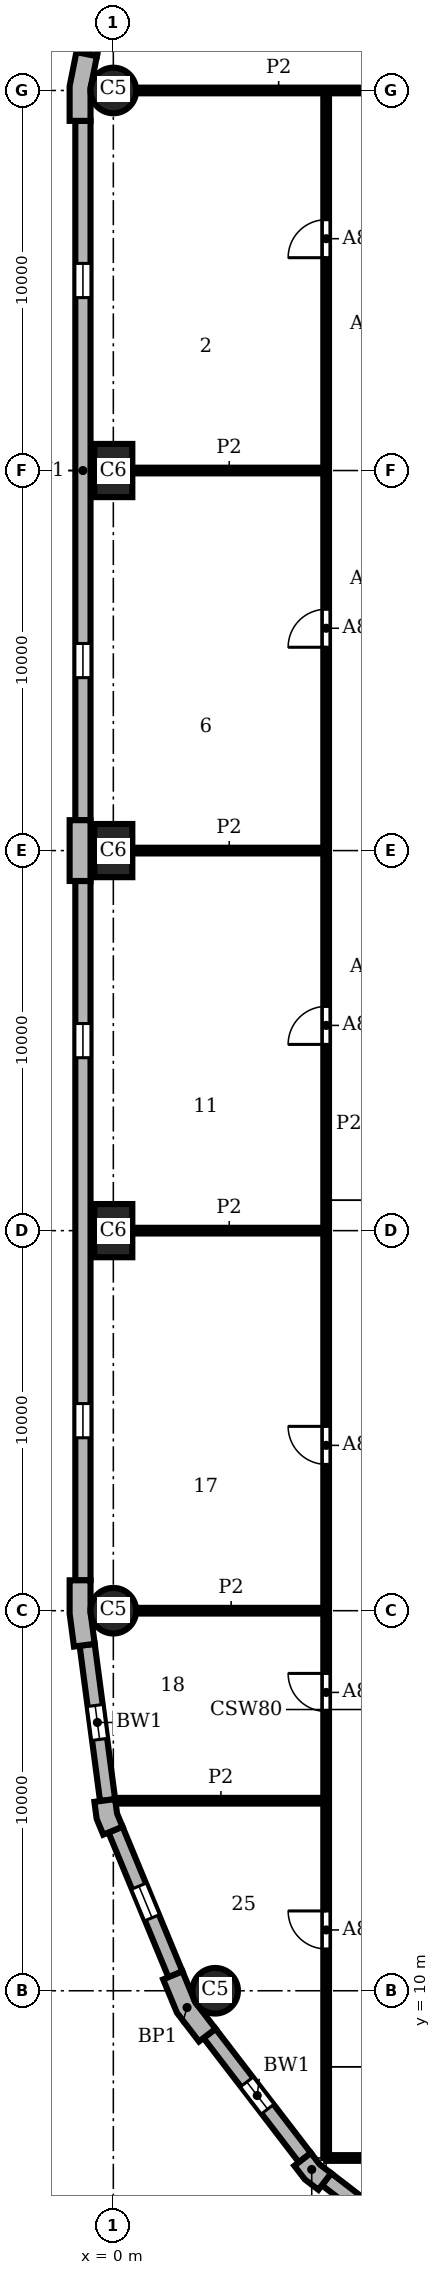
"""IFC4 building model, lengths in metres.
Left out: names, types, materials, properties, quantities, classifications, styles, units other than length and angle.
Written with IfcOpenShell. Run it as: python <this file> out.ifc"""

import sys

from ifc_helpers import new_model, si_unit, direction, frame, frame_2d, origin, origin_2d, place, context, subcontext, project, spatial, polyline, rectangle, circle, outline, extrude, element, fill, save


model = new_model("IFC4")
c1 = context("Model", 3, precision=1e-05, world=origin(), true_north=direction((0.0, 1.0)))
c2 = subcontext(c1, "Body", "Model", "MODEL_VIEW")
j1 = project(units=[si_unit("LENGTHUNIT", "METRE"), si_unit("PLANEANGLEUNIT", "RADIAN")], contexts=[c1])
p1 = place(None, origin())
s1 = spatial("IfcSite", under=j1, at=p1, CompositionType="ELEMENT")
p2 = place(p1, origin())
s2 = spatial("IfcBuilding", under=s1, at=p2, CompositionType="ELEMENT")
p3 = place(p2, frame((0.0, 0.0, 93.9)))
s3 = spatial("IfcBuildingStorey", under=s2, at=p3, CompositionType="ELEMENT", Elevation=93.9)
p4 = place(p3, frame((0.0, 60.0, 0.0), z_axis=(0.0, 0.0, 1.0), x_axis=(1.0, 0.0, 0.0)))
e1 = element("IfcColumn", 1, at=p4, inside=s3, PredefinedType="COLUMN", context=c2, shape_type="SweptSolid", body=[
    extrude(circle(Radius=0.6, at=origin_2d()), origin(), (0.0, 0.0, 1.0), 3.9),
])
for number, where, z_axis, x_axis in (
    (2, (0.0, 50.0, 0.0), (0.0, 0.0, 1.0), (0.0, 1.0, 0.0)),
    (3, (0.0, 40.0, 0.0), (0.0, 0.0, 1.0), (0.0, 1.0, 0.0)),
    (4, (0.0, 30.0, 0.0), (0.0, 0.0, 1.0), (0.0, 1.0, 0.0)),
):
    element("IfcColumn", number, at=place(p3, frame(where, z_axis=z_axis, x_axis=x_axis)), inside=s3, PredefinedType="COLUMN", context=c2, shape_type="SweptSolid", body=[
        extrude(rectangle(XDim=1.4, YDim=1.0, at=origin_2d()), origin(), (0.0, 0.0, 1.0), 3.9),
    ])
for number, where, z_axis, x_axis in (
    (5, (0.0, 20.0, 0.0), (0.0, 0.0, 1.0), (1.0, 0.0, 0.0)),
    (6, (2.679, 10.0, 0.0), (0.0, 0.0, 1.0), (1.0, 0.0, 0.0)),
):
    element("IfcColumn", number, at=place(p3, frame(where, z_axis=z_axis, x_axis=x_axis)), inside=s3, PredefinedType="COLUMN", context=c2, shape_type="SweptSolid", body=[
        extrude(circle(Radius=0.6, at=origin_2d()), origin(), (0.0, 0.0, 1.0), 3.9),
    ])
p5 = place(p3, origin())
e7 = element("IfcWall", 7, at=p5, inside=s3, PredefinedType="SOLIDWALL", context=c2, shape_type="SweptSolid", body=[
    extrude(outline(polyline([(-0.825, 60.98), (-0.972, 61.009), (-1.15, 60.113), (-1.15, 59.2), (-1.0, 59.2), (-0.6, 59.2), (-0.6, 60.059), (-0.432, 60.902), (-0.825, 60.98)])), origin(), (0.0, 0.0, 1.0), 3.9),
])
e8 = element("IfcWall", 8, at=p5, inside=s3, PredefinedType="SOLIDWALL", context=c2, shape_type="SweptSolid", body=[
    extrude(outline(polyline([(-1.0, 40.8), (-1.15, 40.8), (-1.15, 40.0), (-1.15, 39.2), (-1.0, 39.2), (-0.6, 39.2), (-0.6, 40.0), (-0.6, 40.8), (-1.0, 40.8)])), origin(), (0.0, 0.0, 1.0), 3.9),
])
e9 = element("IfcWall", 9, at=p5, inside=s3, PredefinedType="SOLIDWALL", context=c2, shape_type="SweptSolid", body=[
    extrude(outline(polyline([(-1.0, 20.8), (-1.15, 20.8), (-1.15, 19.925), (-1.036, 19.057), (-0.887, 19.076), (-0.49, 19.128), (-0.6, 19.961), (-0.6, 20.8), (-1.0, 20.8)])), origin(), (0.0, 0.0, 1.0), 3.9),
])
e10 = element("IfcWall", 10, at=p5, inside=s3, PredefinedType="SOLIDWALL", context=c2, shape_type="SweptSolid", body=[
    extrude(outline(polyline([(-0.349, 14.99), (-0.498, 14.971), (-0.439, 14.523), (-0.266, 14.106), (-0.128, 14.164), (0.242, 14.317), (0.097, 14.667), (0.047, 15.043), (-0.349, 14.99)])), origin(), (0.0, 0.0, 1.0), 3.9),
])
e11 = element("IfcWall", 11, at=p5, inside=s3, PredefinedType="SOLIDWALL", context=c2, shape_type="SweptSolid", body=[
    extrude(outline(polyline([(1.449, 10.356), (1.311, 10.299), (1.675, 9.42), (2.254, 8.665), (2.373, 8.757), (2.69, 9.0), (2.155, 9.698), (1.819, 10.51), (1.449, 10.356)])), origin(), (0.0, 0.0, 1.0), 3.9),
])
e12 = element("IfcWall", 12, at=p5, inside=s3, PredefinedType="SOLIDWALL", context=c2, shape_type="SweptSolid", body=[
    extrude(outline(polyline([(4.882, 5.487), (4.763, 5.396), (5.038, 5.038), (5.396, 4.763), (5.487, 4.882), (5.731, 5.199), (5.43, 5.43), (5.199, 5.731), (4.882, 5.487)])), origin(), (0.0, 0.0, 1.0), 3.9),
])
p6 = place(p3, frame((0.299, 65.602, 0.0), z_axis=(0.0, 0.0, 1.0), x_axis=(-0.195098533057, -0.98078364709, 0.0)))
e13 = element("IfcWall", 13, at=p6, inside=s3, PredefinedType="SOLIDWALL", context=c2, shape_type="SweptSolid", body=[
    extrude(rectangle(XDim=4.753, YDim=0.4, at=frame_2d((2.376, 0.0))), origin(), (0.0, 0.0, 1.0), 3.9),
])
p7 = place(p6, frame((0.226, 0.0, 0.9)))
e14 = element("IfcOpeningElement", 14, at=p7, cuts=e13, PredefinedType="OPENING", context=c2, shape_type="SweptSolid", body=[
    extrude(rectangle(XDim=4.3, YDim=2.35, at=frame_2d((2.15, 1.175))), frame((0.0, 0.21, 0.0), z_axis=(0.0, -1.0, 0.0), x_axis=(1.0, 0.0, 0.0)), (0.0, 0.0, 1.0), 0.42),
])
p8 = place(p3, frame((-0.8, 59.2, 0.0), z_axis=(0.0, 0.0, 1.0), x_axis=(0.0, -1.0, 0.0)))
e15 = element("IfcWall", 15, at=p8, inside=s3, PredefinedType="SOLIDWALL", context=c2, shape_type="SweptSolid", body=[
    extrude(rectangle(XDim=18.4, YDim=0.4, at=frame_2d((9.2, 0.0))), origin(), (0.0, 0.0, 1.0), 3.9),
])
p9 = place(p8, frame((3.75, 0.0, 0.9)))
e16 = element("IfcOpeningElement", 16, at=p9, cuts=e15, PredefinedType="OPENING", context=c2, shape_type="SweptSolid", body=[
    extrude(rectangle(XDim=0.9, YDim=2.35, at=frame_2d((0.45, 1.175))), frame((0.0, 0.21, 0.0), z_axis=(0.0, -1.0, 0.0), x_axis=(1.0, 0.0, 0.0)), (0.0, 0.0, 1.0), 0.42),
])
p10 = place(p8, frame((13.75, 0.0, 0.9)))
e17 = element("IfcOpeningElement", 17, at=p10, cuts=e15, PredefinedType="OPENING", context=c2, shape_type="SweptSolid", body=[
    extrude(rectangle(XDim=0.9, YDim=2.35, at=frame_2d((0.45, 1.175))), frame((0.0, 0.21, 0.0), z_axis=(0.0, -1.0, 0.0), x_axis=(1.0, 0.0, 0.0)), (0.0, 0.0, 1.0), 0.42),
])
p11 = place(p3, frame((-0.8, 39.2, 0.0), z_axis=(0.0, 0.0, 1.0), x_axis=(0.0, -1.0, 0.0)))
e18 = element("IfcWall", 18, at=p11, inside=s3, PredefinedType="SOLIDWALL", context=c2, shape_type="SweptSolid", body=[
    extrude(rectangle(XDim=18.4, YDim=0.4, at=frame_2d((9.2, 0.0))), origin(), (0.0, 0.0, 1.0), 3.9),
])
p12 = place(p11, frame((3.75, 0.0, 0.9)))
e19 = element("IfcOpeningElement", 19, at=p12, cuts=e18, PredefinedType="OPENING", context=c2, shape_type="SweptSolid", body=[
    extrude(rectangle(XDim=0.9, YDim=2.35, at=frame_2d((0.45, 1.175))), frame((0.0, 0.21, 0.0), z_axis=(0.0, -1.0, 0.0), x_axis=(1.0, 0.0, 0.0)), (0.0, 0.0, 1.0), 0.42),
])
p13 = place(p11, frame((13.75, 0.0, 0.9)))
e20 = element("IfcOpeningElement", 20, at=p13, cuts=e18, PredefinedType="OPENING", context=c2, shape_type="SweptSolid", body=[
    extrude(rectangle(XDim=0.9, YDim=2.35, at=frame_2d((0.45, 1.175))), frame((0.0, 0.21, 0.0), z_axis=(0.0, -1.0, 0.0), x_axis=(1.0, 0.0, 0.0)), (0.0, 0.0, 1.0), 0.42),
])
p14 = place(p3, frame((-0.689, 19.102, 0.0), z_axis=(0.0, 0.0, 1.0), x_axis=(0.130514280502, -0.991446429508, 0.0)))
e21 = element("IfcWall", 21, at=p14, inside=s3, PredefinedType="SOLIDWALL", context=c2, shape_type="SweptSolid", body=[
    extrude(rectangle(XDim=4.121, YDim=0.4, at=frame_2d((2.061, 0.0))), origin(), (0.0, 0.0, 1.0), 3.9),
])
p15 = place(p14, frame((1.611, 0.0, 0.9)))
e22 = element("IfcOpeningElement", 22, at=p15, cuts=e21, PredefinedType="OPENING", context=c2, shape_type="SweptSolid", body=[
    extrude(rectangle(XDim=0.9, YDim=2.35, at=frame_2d((0.45, 1.175))), frame((0.0, 0.21, 0.0), z_axis=(0.0, -1.0, 0.0), x_axis=(1.0, 0.0, 0.0)), (0.0, 0.0, 1.0), 0.42),
])
p16 = place(p3, frame((0.057, 14.24, 0.0), z_axis=(0.0, 0.0, 1.0), x_axis=(0.382721546029, -0.923863744394, 0.0)))
e23 = element("IfcWall", 23, at=p16, inside=s3, PredefinedType="SOLIDWALL", context=c2, shape_type="SweptSolid", body=[
    extrude(rectangle(XDim=4.121, YDim=0.4, at=frame_2d((2.061, 0.0))), origin(), (0.0, 0.0, 1.0), 3.9),
])
p17 = place(p16, frame((1.611, 0.0, 0.9)))
e24 = element("IfcOpeningElement", 24, at=p17, cuts=e23, PredefinedType="OPENING", context=c2, shape_type="SweptSolid", body=[
    extrude(rectangle(XDim=0.9, YDim=2.35, at=frame_2d((0.45, 1.175))), frame((0.0, 0.21, 0.0), z_axis=(0.0, -1.0, 0.0), x_axis=(1.0, 0.0, 0.0)), (0.0, 0.0, 1.0), 0.42),
])
p18 = place(p3, frame((2.532, 8.878, 0.0), z_axis=(0.0, 0.0, 1.0), x_axis=(0.608759824817, -0.793354571229, 0.0)))
e25 = element("IfcWall", 25, at=p18, inside=s3, PredefinedType="SOLIDWALL", context=c2, shape_type="SweptSolid", body=[
    extrude(rectangle(XDim=4.121, YDim=0.4, at=frame_2d((2.061, 0.0))), origin(), (0.0, 0.0, 1.0), 3.9),
])
p19 = place(p18, frame((1.611, 0.0, 0.9)))
e26 = element("IfcOpeningElement", 26, at=p19, cuts=e25, PredefinedType="OPENING", context=c2, shape_type="SweptSolid", body=[
    extrude(rectangle(XDim=0.9, YDim=2.35, at=frame_2d((0.45, 1.175))), frame((0.0, 0.21, 0.0), z_axis=(0.0, -1.0, 0.0), x_axis=(1.0, 0.0, 0.0)), (0.0, 0.0, 1.0), 0.42),
])
p20 = place(p3, frame((5.609, 5.041, 0.0), z_axis=(0.0, 0.0, 1.0), x_axis=(0.793354571229, -0.608759824817, 0.0)))
e27 = element("IfcWall", 27, at=p20, inside=s3, PredefinedType="SOLIDWALL", context=c2, shape_type="SweptSolid", body=[
    extrude(rectangle(XDim=4.121, YDim=0.4, at=frame_2d((2.061, 0.0))), origin(), (0.0, 0.0, 1.0), 3.9),
])
p21 = place(p20, frame((1.611, 0.0, 0.9)))
e28 = element("IfcOpeningElement", 28, at=p21, cuts=e27, PredefinedType="OPENING", context=c2, shape_type="SweptSolid", body=[
    extrude(rectangle(XDim=0.9, YDim=2.35, at=frame_2d((0.45, 1.175))), frame((0.0, 0.21, 0.0), z_axis=(0.0, -1.0, 0.0), x_axis=(1.0, 0.0, 0.0)), (0.0, 0.0, 1.0), 0.42),
])
p22 = place(p3, frame((5.6, 5.6, 0.0), z_axis=(0.0, 0.0, 1.0), x_axis=(0.0, 1.0, 0.0)))
e29 = element("IfcWall", 29, at=p22, inside=s3, PredefinedType="PARTITIONING", context=c2, shape_type="SweptSolid", body=[
    extrude(rectangle(XDim=54.4, YDim=0.15, at=frame_2d((27.2, 0.0))), origin(), (0.0, 0.0, 1.0), 3.58),
])
p23 = place(p22, frame((5.5, 0.0, 0.0)))
e30 = element("IfcOpeningElement", 30, at=p23, cuts=e29, PredefinedType="OPENING", context=c2, shape_type="SweptSolid", body=[
    extrude(rectangle(XDim=1.0, YDim=2.1, at=frame_2d((0.5, 1.05))), frame((0.0, 0.085, 0.0), z_axis=(0.0, -1.0, 0.0), x_axis=(1.0, 0.0, 0.0)), (0.0, 0.0, 1.0), 0.17),
])
p24 = place(p22, frame((11.75, 0.0, 0.0)))
e31 = element("IfcOpeningElement", 31, at=p24, cuts=e29, PredefinedType="OPENING", context=c2, shape_type="SweptSolid", body=[
    extrude(rectangle(XDim=1.0, YDim=2.1, at=frame_2d((0.5, 1.05))), frame((0.0, 0.085, 0.0), z_axis=(0.0, -1.0, 0.0), x_axis=(1.0, 0.0, 0.0)), (0.0, 0.0, 1.0), 0.17),
])
p25 = place(p22, frame((18.25, 0.0, 0.0)))
e32 = element("IfcOpeningElement", 32, at=p25, cuts=e29, PredefinedType="OPENING", context=c2, shape_type="SweptSolid", body=[
    extrude(rectangle(XDim=1.0, YDim=2.1, at=frame_2d((0.5, 1.05))), frame((0.0, 0.085, 0.0), z_axis=(0.0, -1.0, 0.0), x_axis=(1.0, 0.0, 0.0)), (0.0, 0.0, 1.0), 0.17),
])
p26 = place(p22, frame((29.3, 0.0, 0.0)))
e33 = element("IfcOpeningElement", 33, at=p26, cuts=e29, PredefinedType="OPENING", context=c2, shape_type="SweptSolid", body=[
    extrude(rectangle(XDim=1.0, YDim=2.1, at=frame_2d((0.5, 1.05))), frame((0.0, 0.085, 0.0), z_axis=(0.0, -1.0, 0.0), x_axis=(1.0, 0.0, 0.0)), (0.0, 0.0, 1.0), 0.17),
])
p27 = place(p22, frame((39.75, 0.0, 0.0)))
e34 = element("IfcOpeningElement", 34, at=p27, cuts=e29, PredefinedType="OPENING", context=c2, shape_type="SweptSolid", body=[
    extrude(rectangle(XDim=1.0, YDim=2.1, at=frame_2d((0.5, 1.05))), frame((0.0, 0.085, 0.0), z_axis=(0.0, -1.0, 0.0), x_axis=(1.0, 0.0, 0.0)), (0.0, 0.0, 1.0), 0.17),
])
p28 = place(p22, frame((50.0, 0.0, 0.0)))
e35 = element("IfcOpeningElement", 35, at=p28, cuts=e29, PredefinedType="OPENING", context=c2, shape_type="SweptSolid", body=[
    extrude(rectangle(XDim=1.0, YDim=2.1, at=frame_2d((0.5, 1.05))), frame((0.0, 0.085, 0.0), z_axis=(0.0, -1.0, 0.0), x_axis=(1.0, 0.0, 0.0)), (0.0, 0.0, 1.0), 0.17),
])
p29 = place(p3, frame((5.6, 5.6, 0.0), z_axis=(0.0, 0.0, 1.0), x_axis=(1.0, 0.0, 0.0)))
e36 = element("IfcWall", 36, at=p29, inside=s3, PredefinedType="PARTITIONING", context=c2, shape_type="SweptSolid", body=[
    extrude(rectangle(XDim=25.4, YDim=0.15, at=frame_2d((12.7, 0.0))), origin(), (0.0, 0.0, 1.0), 3.58),
])
p30 = place(p29, frame((4.35, 0.0, 0.0)))
e37 = element("IfcOpeningElement", 37, at=p30, cuts=e36, PredefinedType="OPENING", context=c2, shape_type="SweptSolid", body=[
    extrude(rectangle(XDim=1.0, YDim=2.1, at=frame_2d((0.5, 1.05))), frame((0.0, 0.085, 0.0), z_axis=(0.0, -1.0, 0.0), x_axis=(1.0, 0.0, 0.0)), (0.0, 0.0, 1.0), 0.17),
])
p31 = place(p29, frame((11.25, 0.0, 0.0)))
e38 = element("IfcOpeningElement", 38, at=p31, cuts=e36, PredefinedType="OPENING", context=c2, shape_type="SweptSolid", body=[
    extrude(rectangle(XDim=1.1, YDim=2.1, at=frame_2d((0.55, 1.05))), frame((0.0, 0.085, 0.0), z_axis=(0.0, -1.0, 0.0), x_axis=(1.0, 0.0, 0.0)), (0.0, 0.0, 1.0), 0.17),
])
p32 = place(p29, frame((19.75, 0.0, 0.0)))
e39 = element("IfcOpeningElement", 39, at=p32, cuts=e36, PredefinedType="OPENING", context=c2, shape_type="SweptSolid", body=[
    extrude(rectangle(XDim=1.0, YDim=2.1, at=frame_2d((0.5, 1.05))), frame((0.0, 0.085, 0.0), z_axis=(0.0, -1.0, 0.0), x_axis=(1.0, 0.0, 0.0)), (0.0, 0.0, 1.0), 0.17),
])
p33 = place(p3, frame((0.063, 15.0, 0.0), z_axis=(0.0, 0.0, 1.0), x_axis=(1.0, 0.0, 0.0)))
e40 = element("IfcWall", 40, at=p33, inside=s3, PredefinedType="PARTITIONING", context=c2, shape_type="SweptSolid", body=[
    extrude(rectangle(XDim=5.537, YDim=0.15, at=frame_2d((2.769, 0.0))), origin(), (0.0, 0.0, 1.0), 3.58),
])
p34 = place(p3, frame((0.6, 20.0, 0.0), z_axis=(0.0, 0.0, 1.0), x_axis=(1.0, 0.0, 0.0)))
e41 = element("IfcWall", 41, at=p34, inside=s3, PredefinedType="PARTITIONING", context=c2, shape_type="SweptSolid", body=[
    extrude(rectangle(XDim=5.0, YDim=0.15, at=frame_2d((2.5, 0.0))), origin(), (0.0, 0.0, 1.0), 3.58),
])
for number, where, z_axis, x_axis in (
    (42, (0.5, 30.0, 0.0), (0.0, 0.0, 1.0), (1.0, 0.0, 0.0)),
    (43, (0.5, 40.0, 0.0), (0.0, 0.0, 1.0), (1.0, 0.0, 0.0)),
    (44, (0.5, 50.0, 0.0), (0.0, 0.0, 1.0), (1.0, 0.0, 0.0)),
):
    element("IfcWall", number, at=place(p3, frame(where, z_axis=z_axis, x_axis=x_axis)), inside=s3, PredefinedType="PARTITIONING", context=c2, shape_type="SweptSolid", body=[
        extrude(rectangle(XDim=5.1, YDim=0.15, at=frame_2d((2.55, 0.0))), origin(), (0.0, 0.0, 1.0), 3.58),
    ])
p35 = place(p3, frame((0.6, 60.0, 0.0), z_axis=(0.0, 0.0, 1.0), x_axis=(1.0, 0.0, 0.0)))
e45 = element("IfcWall", 45, at=p35, inside=s3, PredefinedType="PARTITIONING", context=c2, shape_type="SweptSolid", body=[
    extrude(rectangle(XDim=7.5, YDim=0.15, at=frame_2d((3.75, 0.0))), origin(), (0.0, 0.0, 1.0), 3.58),
])
p36 = place(p9, origin())
e46 = element("IfcWindow", 46, at=p36, inside=s3, PartitioningType="SINGLE_PANEL", PredefinedType="WINDOW", context=c2, shape_type="SweptSolid", body=[
    extrude(rectangle(XDim=0.9, YDim=2.35, at=frame_2d((0.45, 1.175))), frame((0.0, 0.16, 0.0), z_axis=(0.0, -1.0, 0.0), x_axis=(1.0, 0.0, 0.0)), (0.0, 0.0, 1.0), 0.06),
])
fill(e16, e46)
p37 = place(p10, origin())
e47 = element("IfcWindow", 47, at=p37, inside=s3, PartitioningType="SINGLE_PANEL", PredefinedType="WINDOW", context=c2, shape_type="SweptSolid", body=[
    extrude(rectangle(XDim=0.9, YDim=2.35, at=frame_2d((0.45, 1.175))), frame((0.0, 0.16, 0.0), z_axis=(0.0, -1.0, 0.0), x_axis=(1.0, 0.0, 0.0)), (0.0, 0.0, 1.0), 0.06),
])
fill(e17, e47)
p38 = place(p12, origin())
e48 = element("IfcWindow", 48, at=p38, inside=s3, PartitioningType="SINGLE_PANEL", PredefinedType="WINDOW", context=c2, shape_type="SweptSolid", body=[
    extrude(rectangle(XDim=0.9, YDim=2.35, at=frame_2d((0.45, 1.175))), frame((0.0, 0.16, 0.0), z_axis=(0.0, -1.0, 0.0), x_axis=(1.0, 0.0, 0.0)), (0.0, 0.0, 1.0), 0.06),
])
fill(e19, e48)
p39 = place(p13, origin())
e49 = element("IfcWindow", 49, at=p39, inside=s3, PartitioningType="SINGLE_PANEL", PredefinedType="WINDOW", context=c2, shape_type="SweptSolid", body=[
    extrude(rectangle(XDim=0.9, YDim=2.35, at=frame_2d((0.45, 1.175))), frame((0.0, 0.16, 0.0), z_axis=(0.0, -1.0, 0.0), x_axis=(1.0, 0.0, 0.0)), (0.0, 0.0, 1.0), 0.06),
])
fill(e20, e49)
p40 = place(p15, origin())
e50 = element("IfcWindow", 50, at=p40, inside=s3, PartitioningType="SINGLE_PANEL", PredefinedType="WINDOW", context=c2, shape_type="SweptSolid", body=[
    extrude(rectangle(XDim=0.9, YDim=2.35, at=frame_2d((0.45, 1.175))), frame((0.0, 0.16, 0.0), z_axis=(0.0, -1.0, 0.0), x_axis=(1.0, 0.0, 0.0)), (0.0, 0.0, 1.0), 0.06),
])
fill(e22, e50)
p41 = place(p17, origin())
e51 = element("IfcWindow", 51, at=p41, inside=s3, PartitioningType="SINGLE_PANEL", PredefinedType="WINDOW", context=c2, shape_type="SweptSolid", body=[
    extrude(rectangle(XDim=0.9, YDim=2.35, at=frame_2d((0.45, 1.175))), frame((0.0, 0.16, 0.0), z_axis=(0.0, -1.0, 0.0), x_axis=(1.0, 0.0, 0.0)), (0.0, 0.0, 1.0), 0.06),
])
fill(e24, e51)
p42 = place(p19, origin())
e52 = element("IfcWindow", 52, at=p42, inside=s3, PartitioningType="SINGLE_PANEL", PredefinedType="WINDOW", context=c2, shape_type="SweptSolid", body=[
    extrude(rectangle(XDim=0.9, YDim=2.35, at=frame_2d((0.45, 1.175))), frame((0.0, 0.16, 0.0), z_axis=(0.0, -1.0, 0.0), x_axis=(1.0, 0.0, 0.0)), (0.0, 0.0, 1.0), 0.06),
])
fill(e26, e52)
p43 = place(p23, origin())
e53 = element("IfcDoor", 53, at=p43, inside=s3, OperationType="SINGLE_SWING_RIGHT", PredefinedType="DOOR", context=c2, shape_type="SweptSolid", body=[
    extrude(rectangle(XDim=1.0, YDim=2.1, at=frame_2d((0.5, 1.05))), frame((0.0, 0.025, 0.0), z_axis=(0.0, -1.0, 0.0), x_axis=(1.0, 0.0, 0.0)), (0.0, 0.0, 1.0), 0.05),
])
fill(e30, e53)
p44 = place(p24, origin())
e54 = element("IfcDoor", 54, at=p44, inside=s3, OperationType="SINGLE_SWING_RIGHT", PredefinedType="DOOR", context=c2, shape_type="SweptSolid", body=[
    extrude(rectangle(XDim=1.0, YDim=2.1, at=frame_2d((0.5, 1.05))), frame((0.0, 0.025, 0.0), z_axis=(0.0, -1.0, 0.0), x_axis=(1.0, 0.0, 0.0)), (0.0, 0.0, 1.0), 0.05),
])
fill(e31, e54)
p45 = place(p25, origin())
e55 = element("IfcDoor", 55, at=p45, inside=s3, OperationType="SINGLE_SWING_RIGHT", PredefinedType="DOOR", context=c2, shape_type="SweptSolid", body=[
    extrude(rectangle(XDim=1.0, YDim=2.1, at=frame_2d((0.5, 1.05))), frame((0.0, 0.025, 0.0), z_axis=(0.0, -1.0, 0.0), x_axis=(1.0, 0.0, 0.0)), (0.0, 0.0, 1.0), 0.05),
])
fill(e32, e55)
p46 = place(p26, origin())
e56 = element("IfcDoor", 56, at=p46, inside=s3, OperationType="SINGLE_SWING_LEFT", PredefinedType="DOOR", context=c2, shape_type="SweptSolid", body=[
    extrude(rectangle(XDim=1.0, YDim=2.1, at=frame_2d((0.5, 1.05))), frame((0.0, 0.025, 0.0), z_axis=(0.0, -1.0, 0.0), x_axis=(1.0, 0.0, 0.0)), (0.0, 0.0, 1.0), 0.05),
])
fill(e33, e56)
p47 = place(p27, origin())
e57 = element("IfcDoor", 57, at=p47, inside=s3, OperationType="SINGLE_SWING_LEFT", PredefinedType="DOOR", context=c2, shape_type="SweptSolid", body=[
    extrude(rectangle(XDim=1.0, YDim=2.1, at=frame_2d((0.5, 1.05))), frame((0.0, 0.025, 0.0), z_axis=(0.0, -1.0, 0.0), x_axis=(1.0, 0.0, 0.0)), (0.0, 0.0, 1.0), 0.05),
])
fill(e34, e57)
p48 = place(p28, origin())
e58 = element("IfcDoor", 58, at=p48, inside=s3, OperationType="SINGLE_SWING_LEFT", PredefinedType="DOOR", context=c2, shape_type="SweptSolid", body=[
    extrude(rectangle(XDim=1.0, YDim=2.1, at=frame_2d((0.5, 1.05))), frame((0.0, 0.025, 0.0), z_axis=(0.0, -1.0, 0.0), x_axis=(1.0, 0.0, 0.0)), (0.0, 0.0, 1.0), 0.05),
])
fill(e35, e58)
save(model, sys.argv[1])
